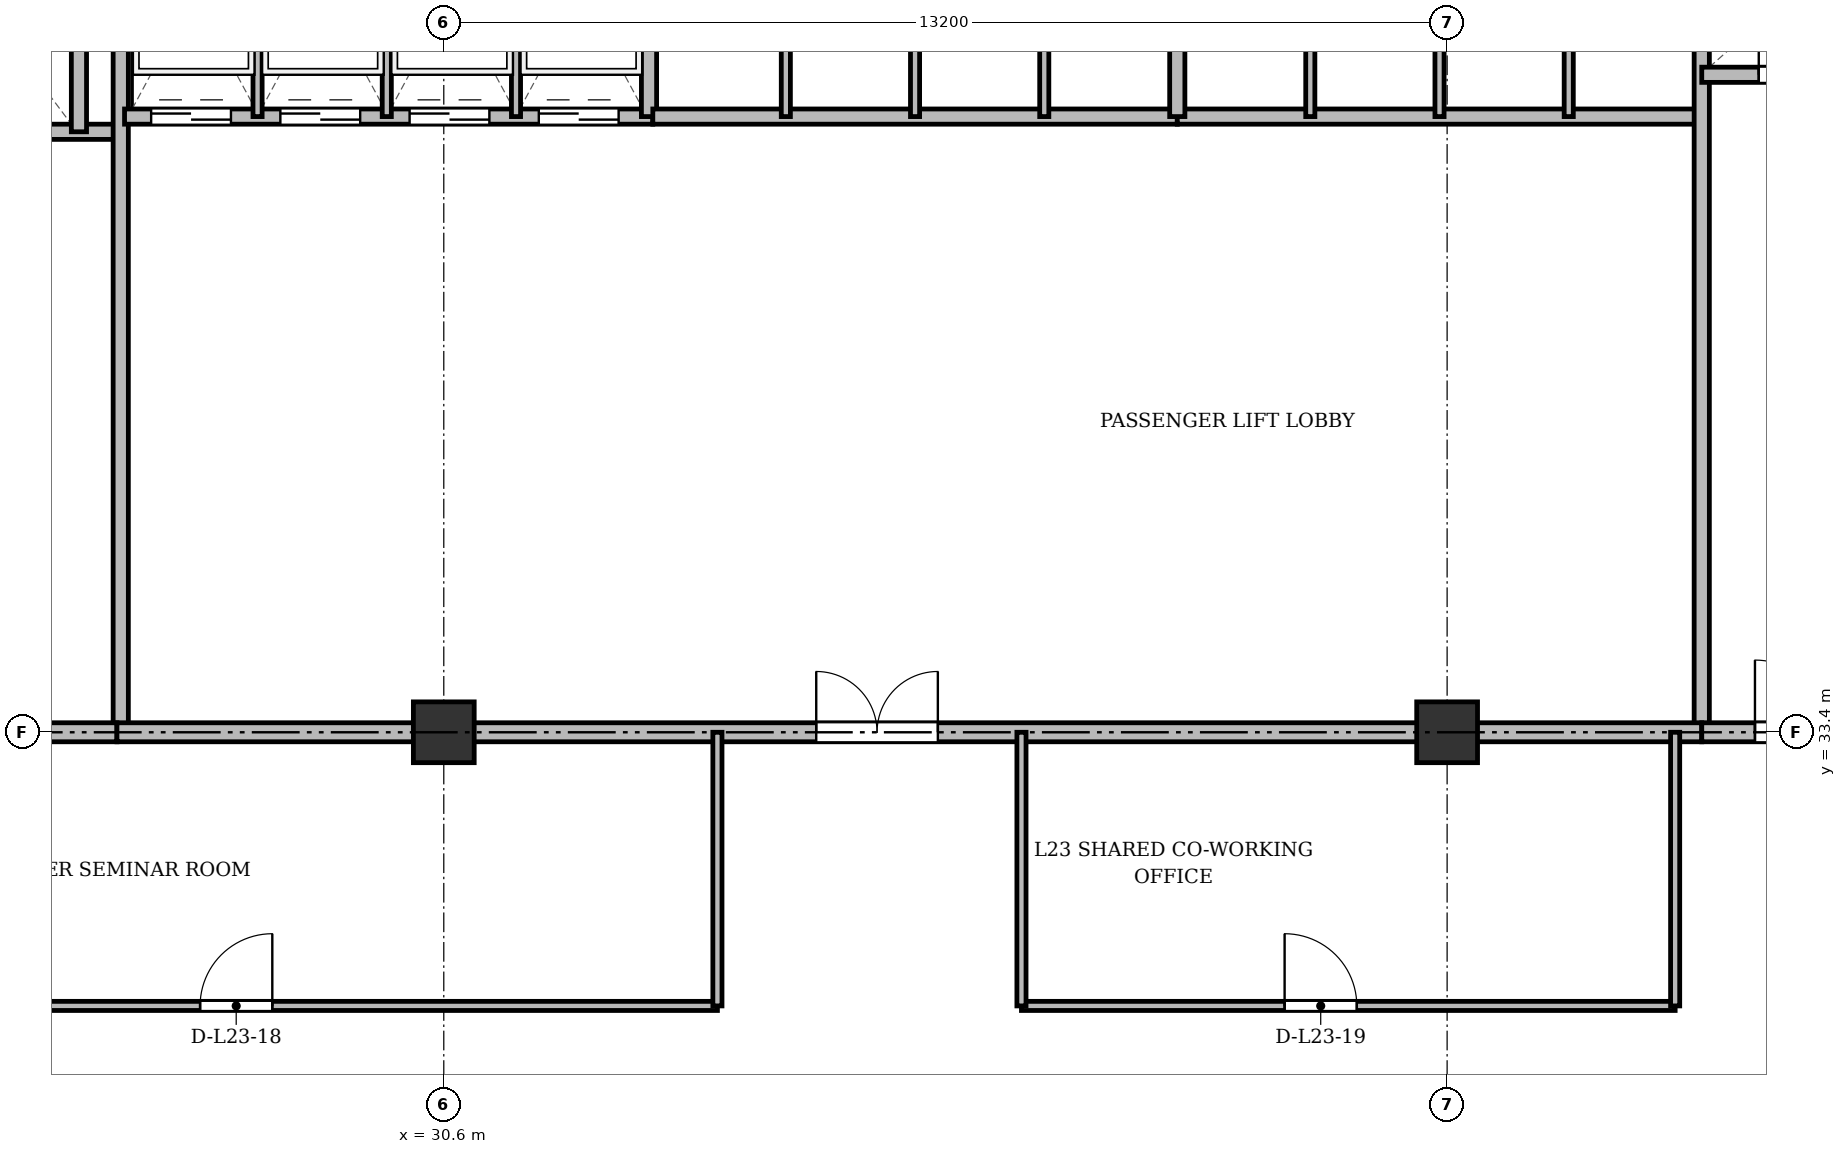
"""IFC4 building model, lengths in metres.
Left out: names, types, materials, properties, quantities, classifications, styles, units other than length and angle.
Written with IfcOpenShell. Run it as: python <this file> out.ifc"""

import sys

from ifc_helpers import new_model, si_unit, direction, frame, frame_2d, origin, origin_2d, place, context, subcontext, project, spatial, rectangle, extrude, source, transform, mapped, element, fill, save


model = new_model("IFC4")
c1 = context("Model", 3, precision=1e-05, world=origin(), true_north=direction((0.0, 1.0)))
c2 = subcontext(c1, "Body", "Model", "MODEL_VIEW")
j1 = project(units=[si_unit("LENGTHUNIT", "METRE"), si_unit("PLANEANGLEUNIT", "RADIAN")], contexts=[c1])
p1 = place(None, origin())
s1 = spatial("IfcSite", under=j1, at=p1, CompositionType="ELEMENT")
p2 = place(p1, origin())
s2 = spatial("IfcBuilding", under=s1, at=p2, CompositionType="ELEMENT")
p3 = place(p2, frame((0.0, 0.0, 92.5)))
s3 = spatial("IfcBuildingStorey", under=s2, at=p3, CompositionType="ELEMENT", Elevation=92.5)
m1 = source(origin(), c2, "Body", "SweptSolid", [
    extrude(rectangle(XDim=0.8, YDim=0.8, at=origin_2d()), origin(), (0.0, 0.0, 1.0), 3.6),
])
for number, where, z_axis, x_axis in (
    (1, (30.6, 33.4, 0.0), (0.0, 0.0, 1.0), (1.0, 0.0, 0.0)),
    (2, (43.8, 33.4, 0.0), (0.0, 0.0, 1.0), (1.0, 0.0, 0.0)),
):
    element("IfcColumn", number, at=place(p3, frame(where, z_axis=z_axis, x_axis=x_axis)), inside=s3, PredefinedType="COLUMN", context=c2, shape_type="MappedRepresentation", body=[
        mapped(m1, transform((0.0, 0.0, 0.0), x_axis=(1.0, 0.0, 0.0), y_axis=(0.0, 1.0, 0.0), z_axis=(0.0, 0.0, 1.0), scale=1.0)),
    ])
p4 = place(p3, frame((19.55, 41.3, 0.0), z_axis=(0.0, 0.0, 1.0), x_axis=(1.0, 0.0, 0.0)))
e3 = element("IfcWall", 3, at=p4, inside=s3, PredefinedType="SOLIDWALL", context=c2, shape_type="SweptSolid", body=[
    extrude(rectangle(XDim=6.75, YDim=0.2, at=frame_2d((3.375, 0.0))), origin(), (0.0, 0.0, 1.0), 3.34),
])
p5 = place(p4, frame((1.7, 0.0, 0.0)))
e4 = element("IfcOpeningElement", 4, at=p5, cuts=e3, PredefinedType="OPENING", context=c2, shape_type="SweptSolid", body=[
    extrude(rectangle(XDim=1.1, YDim=2.15, at=frame_2d((0.55, 1.075))), frame((0.0, 0.11, 0.0), z_axis=(0.0, -1.0, 0.0), x_axis=(1.0, 0.0, 0.0)), (0.0, 0.0, 1.0), 0.22),
])
p6 = place(p4, frame((4.4, 0.0, 0.0)))
e5 = element("IfcOpeningElement", 5, at=p6, cuts=e3, PredefinedType="OPENING", context=c2, shape_type="SweptSolid", body=[
    extrude(rectangle(XDim=1.1, YDim=2.15, at=frame_2d((0.55, 1.075))), frame((0.0, 0.11, 0.0), z_axis=(0.0, -1.0, 0.0), x_axis=(1.0, 0.0, 0.0)), (0.0, 0.0, 1.0), 0.22),
])
p7 = place(p3, frame((25.8, 41.3, 0.0), z_axis=(0.0, 0.0, 1.0), x_axis=(0.0, 1.0, 0.0)))
e6 = element("IfcWall", 6, at=p7, inside=s3, PredefinedType="SOLIDWALL", context=c2, shape_type="SweptSolid", body=[
    extrude(rectangle(XDim=3.4, YDim=0.2, at=frame_2d((1.7, 0.0))), origin(), (0.0, 0.0, 1.0), 3.34),
])
p8 = place(p3, frame((26.35, 33.4, 0.0), z_axis=(0.0, 0.0, 1.0), x_axis=(0.0, 1.0, 0.0)))
e7 = element("IfcWall", 7, at=p8, inside=s3, PredefinedType="SOLIDWALL", context=c2, shape_type="SweptSolid", body=[
    extrude(rectangle(XDim=11.3, YDim=0.2, at=frame_2d((5.65, 0.0))), origin(), (0.0, 0.0, 1.0), 2.752),
])
p9 = place(p3, frame((19.5, 33.4, 0.0), z_axis=(0.0, 0.0, 1.0), x_axis=(1.0, 0.0, 0.0)))
e8 = element("IfcWall", 8, at=p9, inside=s3, PredefinedType="PARTITIONING", context=c2, shape_type="SweptSolid", body=[
    extrude(rectangle(XDim=6.8, YDim=0.25, at=frame_2d((3.4, 0.0))), origin(), (0.0, 0.0, 1.0), 2.752),
])
p10 = place(p9, frame((0.75, 0.0, 0.0)))
e9 = element("IfcOpeningElement", 9, at=p10, cuts=e8, PredefinedType="OPENING", context=c2, shape_type="SweptSolid", body=[
    extrude(rectangle(XDim=1.6, YDim=2.2, at=frame_2d((0.8, 1.1))), frame((0.0, 0.135, 0.0), z_axis=(0.0, -1.0, 0.0), x_axis=(1.0, 0.0, 0.0)), (0.0, 0.0, 1.0), 0.27),
])
p11 = place(p3, frame((26.4, 41.5, 0.0), z_axis=(0.0, 0.0, 1.0), x_axis=(1.0, 0.0, 0.0)))
e10 = element("IfcWall", 10, at=p11, inside=s3, PredefinedType="SOLIDWALL", context=c2, shape_type="SweptSolid", body=[
    extrude(rectangle(XDim=6.95, YDim=0.2, at=frame_2d((3.475, 0.0))), origin(), (0.0, 0.0, 1.0), 3.34),
])
p12 = place(p11, frame((0.35, 0.0, 0.0)))
e11 = element("IfcOpeningElement", 11, at=p12, cuts=e10, PredefinedType="OPENING", context=c2, shape_type="SweptSolid", body=[
    extrude(rectangle(XDim=1.05, YDim=2.15, at=frame_2d((0.525, 1.075))), frame((0.0, 0.11, 0.0), z_axis=(0.0, -1.0, 0.0), x_axis=(1.0, 0.0, 0.0)), (0.0, 0.0, 1.0), 0.22),
])
p13 = place(p11, frame((2.05, 0.0, 0.0)))
e12 = element("IfcOpeningElement", 12, at=p13, cuts=e10, PredefinedType="OPENING", context=c2, shape_type="SweptSolid", body=[
    extrude(rectangle(XDim=1.05, YDim=2.15, at=frame_2d((0.525, 1.075))), frame((0.0, 0.11, 0.0), z_axis=(0.0, -1.0, 0.0), x_axis=(1.0, 0.0, 0.0)), (0.0, 0.0, 1.0), 0.22),
])
p14 = place(p11, frame((3.75, 0.0, 0.0)))
e13 = element("IfcOpeningElement", 13, at=p14, cuts=e10, PredefinedType="OPENING", context=c2, shape_type="SweptSolid", body=[
    extrude(rectangle(XDim=1.05, YDim=2.15, at=frame_2d((0.525, 1.075))), frame((0.0, 0.11, 0.0), z_axis=(0.0, -1.0, 0.0), x_axis=(1.0, 0.0, 0.0)), (0.0, 0.0, 1.0), 0.22),
])
p15 = place(p11, frame((5.45, 0.0, 0.0)))
e14 = element("IfcOpeningElement", 14, at=p15, cuts=e10, PredefinedType="OPENING", context=c2, shape_type="SweptSolid", body=[
    extrude(rectangle(XDim=1.05, YDim=2.15, at=frame_2d((0.525, 1.075))), frame((0.0, 0.11, 0.0), z_axis=(0.0, -1.0, 0.0), x_axis=(1.0, 0.0, 0.0)), (0.0, 0.0, 1.0), 0.22),
])
p16 = place(p3, frame((33.3, 41.5, 0.0), z_axis=(0.0, 0.0, 1.0), x_axis=(0.0, 1.0, 0.0)))
e15 = element("IfcWall", 15, at=p16, inside=s3, PredefinedType="SOLIDWALL", context=c2, shape_type="SweptSolid", body=[
    extrude(rectangle(XDim=3.2, YDim=0.2, at=frame_2d((1.6, 0.0))), origin(), (0.0, 0.0, 1.0), 3.34),
])
for number, where, z_axis, x_axis in (
    (16, (28.15, 41.5, 0.0), (0.0, 0.0, 1.0), (0.0, 1.0, 0.0)),
    (17, (29.85, 41.5, 0.0), (0.0, 0.0, 1.0), (0.0, 1.0, 0.0)),
    (18, (31.55, 41.5, 0.0), (0.0, 0.0, 1.0), (0.0, 1.0, 0.0)),
):
    element("IfcWall", number, at=place(p3, frame(where, z_axis=z_axis, x_axis=x_axis)), inside=s3, PredefinedType="PARTITIONING", context=c2, shape_type="SweptSolid", body=[
        extrude(rectangle(XDim=3.2, YDim=0.12, at=frame_2d((1.6, 0.0))), origin(), (0.0, 0.0, 1.0), 3.34),
    ])
p17 = place(p3, frame((33.35, 41.5, 0.0), z_axis=(0.0, 0.0, 1.0), x_axis=(1.0, 0.0, 0.0)))
e19 = element("IfcWall", 19, at=p17, inside=s3, PredefinedType="SOLIDWALL", context=c2, shape_type="SweptSolid", body=[
    extrude(rectangle(XDim=6.9, YDim=0.2, at=frame_2d((3.45, 0.0))), origin(), (0.0, 0.0, 1.0), 3.34),
])
for number, where, z_axis, x_axis in (
    (20, (35.1, 41.5, 0.0), (0.0, 0.0, 1.0), (0.0, 1.0, 0.0)),
    (21, (36.8, 41.5, 0.0), (0.0, 0.0, 1.0), (0.0, 1.0, 0.0)),
    (22, (38.5, 41.5, 0.0), (0.0, 0.0, 1.0), (0.0, 1.0, 0.0)),
):
    element("IfcWall", number, at=place(p3, frame(where, z_axis=z_axis, x_axis=x_axis)), inside=s3, PredefinedType="PARTITIONING", context=c2, shape_type="SweptSolid", body=[
        extrude(rectangle(XDim=3.2, YDim=0.12, at=frame_2d((1.6, 0.0))), origin(), (0.0, 0.0, 1.0), 3.34),
    ])
p18 = place(p3, frame((40.25, 41.5, 0.0), z_axis=(0.0, 0.0, 1.0), x_axis=(1.0, 0.0, 0.0)))
e23 = element("IfcWall", 23, at=p18, inside=s3, PredefinedType="SOLIDWALL", context=c2, shape_type="SweptSolid", body=[
    extrude(rectangle(XDim=6.9, YDim=0.2, at=frame_2d((3.45, 0.0))), origin(), (0.0, 0.0, 1.0), 2.84),
])
p19 = place(p3, frame((40.25, 41.5, 0.0), z_axis=(0.0, 0.0, 1.0), x_axis=(0.0, 1.0, 0.0)))
e24 = element("IfcWall", 24, at=p19, inside=s3, PredefinedType="SOLIDWALL", context=c2, shape_type="SweptSolid", body=[
    extrude(rectangle(XDim=3.2, YDim=0.2, at=frame_2d((1.6, 0.0))), origin(), (0.0, 0.0, 1.0), 3.34),
])
p20 = place(p3, frame((42.0, 41.5, 0.0), z_axis=(0.0, 0.0, 1.0), x_axis=(0.0, 1.0, 0.0)))
e25 = element("IfcWall", 25, at=p20, inside=s3, PredefinedType="PARTITIONING", context=c2, shape_type="SweptSolid", body=[
    extrude(rectangle(XDim=3.2, YDim=0.12, at=frame_2d((1.6, 0.0))), origin(), (0.0, 0.0, 1.0), 3.34),
])
p21 = place(p3, frame((43.7, 41.5, 0.0), z_axis=(0.0, 0.0, 1.0), x_axis=(0.0, 1.0, 0.0)))
e26 = element("IfcWall", 26, at=p21, inside=s3, PredefinedType="PARTITIONING", context=c2, shape_type="SweptSolid", body=[
    extrude(rectangle(XDim=3.2, YDim=0.12, at=frame_2d((1.6, 0.0))), origin(), (0.0, 0.0, 1.0), 2.84),
])
p22 = place(p3, frame((45.4, 41.5, 0.0), z_axis=(0.0, 0.0, 1.0), x_axis=(0.0, 1.0, 0.0)))
e27 = element("IfcWall", 27, at=p22, inside=s3, PredefinedType="PARTITIONING", context=c2, shape_type="SweptSolid", body=[
    extrude(rectangle(XDim=3.2, YDim=0.12, at=frame_2d((1.6, 0.0))), origin(), (0.0, 0.0, 1.0), 3.34),
])
p23 = place(p3, frame((47.15, 33.4, 0.0), z_axis=(0.0, 0.0, 1.0), x_axis=(0.0, 1.0, 0.0)))
e28 = element("IfcWall", 28, at=p23, inside=s3, PredefinedType="SOLIDWALL", context=c2, shape_type="SweptSolid", body=[
    extrude(rectangle(XDim=11.3, YDim=0.2, at=frame_2d((5.65, 0.0))), origin(), (0.0, 0.0, 1.0), 2.752),
])
p24 = place(p3, frame((26.3, 33.4, 0.0), z_axis=(0.0, 0.0, 1.0), x_axis=(1.0, 0.0, 0.0)))
e29 = element("IfcWall", 29, at=p24, inside=s3, PredefinedType="PARTITIONING", context=c2, shape_type="SweptSolid", body=[
    extrude(rectangle(XDim=20.85, YDim=0.25, at=frame_2d((10.425, 0.0))), origin(), (0.0, 0.0, 1.0), 2.752),
])
p25 = place(p24, frame((9.2, 0.0, 0.0)))
e30 = element("IfcOpeningElement", 30, at=p25, cuts=e29, PredefinedType="OPENING", context=c2, shape_type="SweptSolid", body=[
    extrude(rectangle(XDim=1.6, YDim=2.2, at=frame_2d((0.8, 1.1))), frame((0.0, 0.135, 0.0), z_axis=(0.0, -1.0, 0.0), x_axis=(1.0, 0.0, 0.0)), (0.0, 0.0, 1.0), 0.27),
])
p26 = place(p3, frame((47.15, 42.05, 0.0), z_axis=(0.0, 0.0, 1.0), x_axis=(1.0, 0.0, 0.0)))
e31 = element("IfcWall", 31, at=p26, inside=s3, PredefinedType="SOLIDWALL", context=c2, shape_type="SweptSolid", body=[
    extrude(rectangle(XDim=7.85, YDim=0.2, at=frame_2d((3.925, 0.0))), origin(), (0.0, 0.0, 1.0), 2.84),
])
p27 = place(p26, frame((0.75, 0.0, 0.0)))
e32 = element("IfcOpeningElement", 32, at=p27, cuts=e31, PredefinedType="OPENING", context=c2, shape_type="SweptSolid", body=[
    extrude(rectangle(XDim=0.9, YDim=2.1, at=frame_2d((0.45, 1.05))), frame((0.0, 0.11, 0.0), z_axis=(0.0, -1.0, 0.0), x_axis=(1.0, 0.0, 0.0)), (0.0, 0.0, 1.0), 0.22),
])
p28 = place(p26, frame((3.85, 0.0, 0.0)))
e33 = element("IfcOpeningElement", 33, at=p28, cuts=e31, PredefinedType="OPENING", context=c2, shape_type="SweptSolid", body=[
    extrude(rectangle(XDim=0.9, YDim=2.1, at=frame_2d((0.45, 1.05))), frame((0.0, 0.11, 0.0), z_axis=(0.0, -1.0, 0.0), x_axis=(1.0, 0.0, 0.0)), (0.0, 0.0, 1.0), 0.22),
])
p29 = place(p3, frame((47.15, 33.4, 0.0), z_axis=(0.0, 0.0, 1.0), x_axis=(1.0, 0.0, 0.0)))
e34 = element("IfcWall", 34, at=p29, inside=s3, PredefinedType="PARTITIONING", context=c2, shape_type="SweptSolid", body=[
    extrude(rectangle(XDim=11.15, YDim=0.25, at=frame_2d((5.575, 0.0))), origin(), (0.0, 0.0, 1.0), 2.752),
])
p30 = place(p29, frame((0.7, 0.0, 0.0)))
e35 = element("IfcOpeningElement", 35, at=p30, cuts=e34, PredefinedType="OPENING", context=c2, shape_type="SweptSolid", body=[
    extrude(rectangle(XDim=0.95, YDim=2.15, at=frame_2d((0.475, 1.075))), frame((0.0, 0.135, 0.0), z_axis=(0.0, -1.0, 0.0), x_axis=(1.0, 0.0, 0.0)), (0.0, 0.0, 1.0), 0.27),
])
p31 = place(p29, frame((6.0, 0.0, 0.0)))
e36 = element("IfcOpeningElement", 36, at=p31, cuts=e34, PredefinedType="OPENING", context=c2, shape_type="SweptSolid", body=[
    extrude(rectangle(XDim=1.2, YDim=2.15, at=frame_2d((0.6, 1.075))), frame((0.0, 0.135, 0.0), z_axis=(0.0, -1.0, 0.0), x_axis=(1.0, 0.0, 0.0)), (0.0, 0.0, 1.0), 0.27),
])
p32 = place(p3, frame((22.45, 29.8, 0.0), z_axis=(0.0, 0.0, 1.0), x_axis=(1.0, 0.0, 0.0)))
e37 = element("IfcWall", 37, at=p32, inside=s3, PredefinedType="PARTITIONING", context=c2, shape_type="SweptSolid", body=[
    extrude(rectangle(XDim=11.75, YDim=0.12, at=frame_2d((5.875, 0.0))), origin(), (0.0, 0.0, 1.0), 2.84),
])
p33 = place(p32, frame((4.944, 0.0, 0.0)))
e38 = element("IfcOpeningElement", 38, at=p33, cuts=e37, PredefinedType="OPENING", context=c2, shape_type="SweptSolid", body=[
    extrude(rectangle(XDim=0.95, YDim=2.15, at=frame_2d((0.475, 1.075))), frame((0.0, 0.07, 0.0), z_axis=(0.0, -1.0, 0.0), x_axis=(1.0, 0.0, 0.0)), (0.0, 0.0, 1.0), 0.14),
])
p34 = place(p3, frame((38.2, 29.8, 0.0), z_axis=(0.0, 0.0, 1.0), x_axis=(1.0, 0.0, 0.0)))
e39 = element("IfcWall", 39, at=p34, inside=s3, PredefinedType="PARTITIONING", context=c2, shape_type="SweptSolid", body=[
    extrude(rectangle(XDim=8.6, YDim=0.12, at=frame_2d((4.3, 0.0))), origin(), (0.0, 0.0, 1.0), 2.84),
])
p35 = place(p34, frame((3.462, 0.0, 0.0)))
e40 = element("IfcOpeningElement", 40, at=p35, cuts=e39, PredefinedType="OPENING", context=c2, shape_type="SweptSolid", body=[
    extrude(rectangle(XDim=0.95, YDim=2.15, at=frame_2d((0.475, 1.075))), frame((0.0, 0.07, 0.0), z_axis=(0.0, -1.0, 0.0), x_axis=(1.0, 0.0, 0.0)), (0.0, 0.0, 1.0), 0.14),
])
for number, where, z_axis, x_axis in (
    (41, (34.2, 29.8, 0.0), (0.0, 0.0, 1.0), (0.0, 1.0, 0.0)),
    (42, (38.2, 29.8, 0.0), (0.0, 0.0, 1.0), (0.0, 1.0, 0.0)),
    (43, (46.8, 29.8, 0.0), (0.0, 0.0, 1.0), (0.0, 1.0, 0.0)),
):
    element("IfcWall", number, at=place(p3, frame(where, z_axis=z_axis, x_axis=x_axis)), inside=s3, PredefinedType="PARTITIONING", context=c2, shape_type="SweptSolid", body=[
        extrude(rectangle(XDim=3.6, YDim=0.12, at=frame_2d((1.8, 0.0))), origin(), (0.0, 0.0, 1.0), 2.752),
    ])
m2 = source(origin(), c2, "Body", "SweptSolid", [
    extrude(rectangle(XDim=1.05, YDim=2.15, at=frame_2d((0.525, 1.075))), frame((0.0, 0.025, 0.0), z_axis=(0.0, -1.0, 0.0), x_axis=(1.0, 0.0, 0.0)), (0.0, 0.0, 1.0), 0.05),
])
p36 = place(p12, origin())
e44 = element("IfcDoor", 44, at=p36, inside=s3, OperationType="DOUBLE_DOOR_SLIDING", PredefinedType="DOOR", context=c2, shape_type="MappedRepresentation", body=[
    mapped(m2, transform((0.0, 0.0, 0.0), x_axis=(1.0, 0.0, 0.0), y_axis=(0.0, 1.0, 0.0), z_axis=(0.0, 0.0, 1.0), scale=1.0)),
])
fill(e11, e44)
p37 = place(p13, origin())
e45 = element("IfcDoor", 45, at=p37, inside=s3, OperationType="DOUBLE_DOOR_SLIDING", PredefinedType="DOOR", context=c2, shape_type="MappedRepresentation", body=[
    mapped(m2, transform((0.0, 0.0, 0.0), x_axis=(1.0, 0.0, 0.0), y_axis=(0.0, 1.0, 0.0), z_axis=(0.0, 0.0, 1.0), scale=1.0)),
])
fill(e12, e45)
p38 = place(p14, origin())
e46 = element("IfcDoor", 46, at=p38, inside=s3, OperationType="DOUBLE_DOOR_SLIDING", PredefinedType="DOOR", context=c2, shape_type="MappedRepresentation", body=[
    mapped(m2, transform((0.0, 0.0, 0.0), x_axis=(1.0, 0.0, 0.0), y_axis=(0.0, 1.0, 0.0), z_axis=(0.0, 0.0, 1.0), scale=1.0)),
])
fill(e13, e46)
p39 = place(p15, origin())
e47 = element("IfcDoor", 47, at=p39, inside=s3, OperationType="DOUBLE_DOOR_SLIDING", PredefinedType="DOOR", context=c2, shape_type="MappedRepresentation", body=[
    mapped(m2, transform((0.0, 0.0, 0.0), x_axis=(1.0, 0.0, 0.0), y_axis=(0.0, 1.0, 0.0), z_axis=(0.0, 0.0, 1.0), scale=1.0)),
])
fill(e14, e47)
m3 = source(origin(), c2, "Body", "SweptSolid", [
    extrude(rectangle(XDim=1.6, YDim=2.2, at=frame_2d((0.8, 1.1))), frame((0.0, 0.025, 0.0), z_axis=(0.0, -1.0, 0.0), x_axis=(1.0, 0.0, 0.0)), (0.0, 0.0, 1.0), 0.05),
])
p40 = place(p25, origin())
e48 = element("IfcDoor", 48, at=p40, inside=s3, OperationType="DOUBLE_DOOR_SINGLE_SWING", PredefinedType="DOOR", context=c2, shape_type="MappedRepresentation", body=[
    mapped(m3, transform((0.0, 0.0, 0.0), x_axis=(1.0, 0.0, 0.0), y_axis=(0.0, 1.0, 0.0), z_axis=(0.0, 0.0, 1.0), scale=1.0)),
])
fill(e30, e48)
m4 = source(origin(), c2, "Body", "SweptSolid", [
    extrude(rectangle(XDim=0.9, YDim=2.1, at=frame_2d((0.45, 1.05))), frame((0.0, 0.025, 0.0), z_axis=(0.0, -1.0, 0.0), x_axis=(1.0, 0.0, 0.0)), (0.0, 0.0, 1.0), 0.05),
])
p41 = place(p27, origin())
e49 = element("IfcDoor", 49, at=p41, inside=s3, OperationType="SINGLE_SWING_LEFT", PredefinedType="DOOR", context=c2, shape_type="MappedRepresentation", body=[
    mapped(m4, transform((0.0, 0.0, 0.0), x_axis=(1.0, 0.0, 0.0), y_axis=(0.0, 1.0, 0.0), z_axis=(0.0, 0.0, 1.0), scale=1.0)),
])
fill(e32, e49)
m5 = source(origin(), c2, "Body", "SweptSolid", [
    extrude(rectangle(XDim=0.95, YDim=2.15, at=frame_2d((0.475, 1.075))), frame((0.0, 0.025, 0.0), z_axis=(0.0, -1.0, 0.0), x_axis=(1.0, 0.0, 0.0)), (0.0, 0.0, 1.0), 0.05),
])
p42 = place(p30, origin())
e50 = element("IfcDoor", 50, at=p42, inside=s3, OperationType="SINGLE_SWING_LEFT", PredefinedType="DOOR", context=c2, shape_type="MappedRepresentation", body=[
    mapped(m5, transform((0.0, 0.0, 0.0), x_axis=(1.0, 0.0, 0.0), y_axis=(0.0, 1.0, 0.0), z_axis=(0.0, 0.0, 1.0), scale=1.0)),
])
fill(e35, e50)
p43 = place(p33, origin())
e51 = element("IfcDoor", 51, at=p43, inside=s3, OperationType="SINGLE_SWING_RIGHT", PredefinedType="DOOR", context=c2, shape_type="MappedRepresentation", body=[
    mapped(m5, transform((0.0, 0.0, 0.0), x_axis=(1.0, 0.0, 0.0), y_axis=(0.0, 1.0, 0.0), z_axis=(0.0, 0.0, 1.0), scale=1.0)),
])
fill(e38, e51)
p44 = place(p35, origin())
e52 = element("IfcDoor", 52, at=p44, inside=s3, OperationType="SINGLE_SWING_LEFT", PredefinedType="DOOR", context=c2, shape_type="MappedRepresentation", body=[
    mapped(m5, transform((0.0, 0.0, 0.0), x_axis=(1.0, 0.0, 0.0), y_axis=(0.0, 1.0, 0.0), z_axis=(0.0, 0.0, 1.0), scale=1.0)),
])
fill(e40, e52)
save(model, sys.argv[1])
